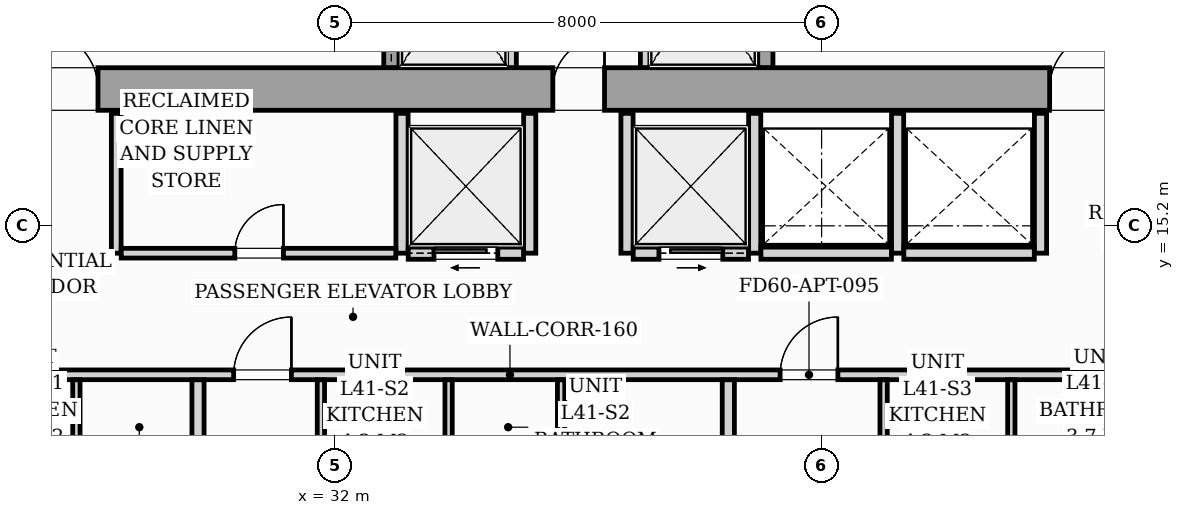
"""IFC4 building model, lengths in metres.
Left out: names, types, materials, properties, quantities, classifications, styles, units other than length and angle.
Written with IfcOpenShell. Run it as: python <this file> out.ifc"""

import sys

from ifc_helpers import new_model, si_unit, direction, frame, frame_2d, origin, origin_2d, place, context, subcontext, project, spatial, rectangle, i_section, extrude, source, transform, mapped, element, fill, save


model = new_model("IFC4")
c1 = context("Model", 3, precision=1e-05, world=origin(), true_north=direction((0.0, 1.0)))
c2 = subcontext(c1, "Body", "Model", "MODEL_VIEW")
j1 = project(units=[si_unit("LENGTHUNIT", "METRE"), si_unit("PLANEANGLEUNIT", "RADIAN")], contexts=[c1])
p1 = place(None, origin())
s1 = spatial("IfcSite", under=j1, at=p1, CompositionType="ELEMENT")
p2 = place(p1, origin())
s2 = spatial("IfcBuilding", under=s1, at=p2, CompositionType="ELEMENT")
p3 = place(p2, frame((0.0, 0.0, 143.8)))
s3 = spatial("IfcBuildingStorey", under=s2, at=p3, CompositionType="ELEMENT", Elevation=143.8)
m1 = source(origin(), c2, "Body", "SweptSolid", [
    extrude(i_section(OverallWidth=0.421, OverallDepth=0.465, WebThickness=0.045, FlangeThickness=0.073, FilletRadius=0.018, at=origin_2d()), origin(), (0.0, 0.0, 1.0), 3.196),
])
for number, where, z_axis, x_axis in (
    (1, (33.12, 17.4, 0.002), (0.0, 0.0, 1.0), (1.0, 0.0, 0.0)),
    (2, (38.88, 17.4, 0.002), (0.0, 0.0, 1.0), (1.0, 0.0, 0.0)),
):
    element("IfcColumn", number, at=place(p3, frame(where, z_axis=z_axis, x_axis=x_axis)), inside=s3, PredefinedType="PILASTER", context=c2, shape_type="MappedRepresentation", body=[
        mapped(m1, transform((0.0, 0.0, 0.0), scale=1.0)),
    ])
p4 = place(p3, frame((26.1, 17.45, 0.0), z_axis=(0.0, 0.0, 1.0), x_axis=(1.0, 0.0, 0.0)))
e3 = element("IfcWall", 3, at=p4, inside=s3, PredefinedType="SHEAR", context=c2, shape_type="SweptSolid", body=[
    extrude(rectangle(XDim=19.8, YDim=0.7, at=frame_2d((9.9, 0.0))), origin(), (0.0, 0.0, 1.0), 3.2),
])
p5 = place(p4, frame((1.05, 0.0, 0.0)))
e4 = element("IfcOpeningElement", 4, at=p5, cuts=e3, PredefinedType="OPENING", context=c2, shape_type="SweptSolid", body=[
    extrude(rectangle(XDim=0.95, YDim=2.06, at=frame_2d((0.475, 1.03))), frame((0.0, 0.36, 0.0), z_axis=(0.0, -1.0, 0.0), x_axis=(1.0, 0.0, 0.0)), (0.0, 0.0, 1.0), 0.72),
])
p6 = place(p4, frame((9.48, 0.0, 0.0)))
e5 = element("IfcOpeningElement", 5, at=p6, cuts=e3, PredefinedType="OPENING", context=c2, shape_type="SweptSolid", body=[
    extrude(rectangle(XDim=0.85, YDim=2.0, at=frame_2d((0.425, 1.0))), frame((0.0, 0.36, 0.0), z_axis=(0.0, -1.0, 0.0), x_axis=(1.0, 0.0, 0.0)), (0.0, 0.0, 1.0), 0.72),
])
p7 = place(p4, frame((17.65, 0.0, 0.0)))
e6 = element("IfcOpeningElement", 6, at=p7, cuts=e3, PredefinedType="OPENING", context=c2, shape_type="SweptSolid", body=[
    extrude(rectangle(XDim=0.95, YDim=2.06, at=frame_2d((0.475, 1.03))), frame((0.0, 0.36, 0.0), z_axis=(0.0, -1.0, 0.0), x_axis=(1.0, 0.0, 0.0)), (0.0, 0.0, 1.0), 0.72),
])
p8 = place(p3, frame((32.925, 17.802, 0.0), z_axis=(0.0, 0.0, 1.0), x_axis=(0.0, 1.0, 0.0)))
e7 = element("IfcWall", 7, at=p8, inside=s3, PredefinedType="SOLIDWALL", context=c2, shape_type="SweptSolid", body=[
    extrude(rectangle(XDim=2.646, YDim=0.25, at=frame_2d((1.323, 0.0))), origin(), (0.0, 0.0, 1.0), 3.2),
])
p9 = place(p8, frame((0.598, 0.0, 0.0)))
e8 = element("IfcOpeningElement", 8, at=p9, cuts=e7, PredefinedType="OPENING", context=c2, shape_type="SweptSolid", body=[
    extrude(rectangle(XDim=1.1, YDim=2.08, at=frame_2d((0.55, 1.04))), frame((0.0, 0.135, 0.0), z_axis=(0.0, -1.0, 0.0), x_axis=(1.0, 0.0, 0.0)), (0.0, 0.0, 1.0), 0.27),
])
for number, where, z_axis, x_axis in (
    (9, (34.9, 17.802, 0.0), (0.0, 0.0, 1.0), (0.0, 1.0, 0.0)),
    (10, (37.1, 17.802, 0.0), (0.0, 0.0, 1.0), (0.0, 1.0, 0.0)),
):
    element("IfcWall", number, at=place(p3, frame(where, z_axis=z_axis, x_axis=x_axis)), inside=s3, PredefinedType="PARTITIONING", context=c2, shape_type="SweptSolid", body=[
        extrude(rectangle(XDim=2.646, YDim=0.16, at=frame_2d((1.323, 0.0))), origin(), (0.0, 0.0, 1.0), 2.94),
    ])
p10 = place(p3, frame((39.075, 17.802, 0.0), z_axis=(0.0, 0.0, 1.0), x_axis=(0.0, 1.0, 0.0)))
e11 = element("IfcWall", 11, at=p10, inside=s3, PredefinedType="SOLIDWALL", context=c2, shape_type="SweptSolid", body=[
    extrude(rectangle(XDim=2.646, YDim=0.25, at=frame_2d((1.323, 0.0))), origin(), (0.0, 0.0, 1.0), 3.2),
])
p11 = place(p10, frame((0.598, 0.0, 0.0)))
e12 = element("IfcOpeningElement", 12, at=p11, cuts=e11, PredefinedType="OPENING", context=c2, shape_type="SweptSolid", body=[
    extrude(rectangle(XDim=1.1, YDim=2.08, at=frame_2d((0.55, 1.04))), frame((0.0, 0.135, 0.0), z_axis=(0.0, -1.0, 0.0), x_axis=(1.0, 0.0, 0.0)), (0.0, 0.0, 1.0), 0.27),
])
p12 = place(p3, frame((28.4, 14.75, 0.0), z_axis=(0.0, 0.0, 1.0), x_axis=(0.0, 1.0, 0.0)))
e13 = element("IfcWall", 13, at=p12, inside=s3, PredefinedType="PARTITIONING", context=c2, shape_type="SweptSolid", body=[
    extrude(rectangle(XDim=2.3, YDim=0.16, at=frame_2d((1.15, 0.0))), origin(), (0.0, 0.0, 1.0), 2.94),
])
p13 = place(p3, frame((33.1, 14.75, 0.0), z_axis=(0.0, 0.0, 1.0), x_axis=(0.0, 1.0, 0.0)))
e14 = element("IfcWall", 14, at=p13, inside=s3, PredefinedType="PARTITIONING", context=c2, shape_type="SweptSolid", body=[
    extrude(rectangle(XDim=2.3, YDim=0.2, at=frame_2d((1.15, 0.0))), origin(), (0.0, 0.0, 1.0), 2.94),
])
p14 = place(p3, frame((28.482, 14.75, 0.0), z_axis=(0.0, 0.0, 1.0), x_axis=(1.0, 0.0, 0.0)))
e15 = element("IfcWall", 15, at=p14, inside=s3, PredefinedType="PARTITIONING", context=c2, shape_type="SweptSolid", body=[
    extrude(rectangle(XDim=4.516, YDim=0.16, at=frame_2d((2.258, 0.0))), origin(), (0.0, 0.0, 1.0), 2.94),
])
p15 = place(p14, frame((1.868, 0.0, 0.0)))
e16 = element("IfcOpeningElement", 16, at=p15, cuts=e15, PredefinedType="OPENING", context=c2, shape_type="SweptSolid", body=[
    extrude(rectangle(XDim=0.8, YDim=2.05, at=frame_2d((0.4, 1.025))), frame((0.0, 0.09, 0.0), z_axis=(0.0, -1.0, 0.0), x_axis=(1.0, 0.0, 0.0)), (0.0, 0.0, 1.0), 0.18),
])
p16 = place(p3, frame((35.2, 14.75, 0.0), z_axis=(0.0, 0.0, 1.0), x_axis=(0.0, 1.0, 0.0)))
e17 = element("IfcWall", 17, at=p16, inside=s3, PredefinedType="PARTITIONING", context=c2, shape_type="SweptSolid", body=[
    extrude(rectangle(XDim=2.3, YDim=0.2, at=frame_2d((1.15, 0.0))), origin(), (0.0, 0.0, 1.0), 2.94),
])
p17 = place(p3, frame((33.202, 14.75, 0.0), z_axis=(0.0, 0.0, 1.0), x_axis=(1.0, 0.0, 0.0)))
e18 = element("IfcWall", 18, at=p17, inside=s3, PredefinedType="PARTITIONING", context=c2, shape_type="SweptSolid", body=[
    extrude(rectangle(XDim=1.896, YDim=0.2, at=frame_2d((0.948, 0.0))), origin(), (0.0, 0.0, 1.0), 2.94),
])
p18 = place(p17, frame((0.423, 0.0, 0.0)))
e19 = element("IfcOpeningElement", 19, at=p18, cuts=e18, PredefinedType="OPENING", context=c2, shape_type="SweptSolid", body=[
    extrude(rectangle(XDim=1.05, YDim=2.08, at=frame_2d((0.525, 1.04))), frame((0.0, 0.11, 0.0), z_axis=(0.0, -1.0, 0.0), x_axis=(1.0, 0.0, 0.0)), (0.0, 0.0, 1.0), 0.22),
])
for number, where, z_axis, x_axis in (
    (20, (36.8, 14.75, 0.0), (0.0, 0.0, 1.0), (0.0, 1.0, 0.0)),
    (21, (38.9, 14.75, 0.0), (0.0, 0.0, 1.0), (0.0, 1.0, 0.0)),
):
    element("IfcWall", number, at=place(p3, frame(where, z_axis=z_axis, x_axis=x_axis)), inside=s3, PredefinedType="PARTITIONING", context=c2, shape_type="SweptSolid", body=[
        extrude(rectangle(XDim=2.3, YDim=0.2, at=frame_2d((1.15, 0.0))), origin(), (0.0, 0.0, 1.0), 2.94),
    ])
p19 = place(p3, frame((36.902, 14.75, 0.0), z_axis=(0.0, 0.0, 1.0), x_axis=(1.0, 0.0, 0.0)))
e22 = element("IfcWall", 22, at=p19, inside=s3, PredefinedType="PARTITIONING", context=c2, shape_type="SweptSolid", body=[
    extrude(rectangle(XDim=1.896, YDim=0.2, at=frame_2d((0.948, 0.0))), origin(), (0.0, 0.0, 1.0), 2.94),
])
p20 = place(p19, frame((0.423, 0.0, 0.0)))
e23 = element("IfcOpeningElement", 23, at=p20, cuts=e22, PredefinedType="OPENING", context=c2, shape_type="SweptSolid", body=[
    extrude(rectangle(XDim=1.05, YDim=2.08, at=frame_2d((0.525, 1.04))), frame((0.0, 0.11, 0.0), z_axis=(0.0, -1.0, 0.0), x_axis=(1.0, 0.0, 0.0)), (0.0, 0.0, 1.0), 0.22),
])
for number, where, z_axis, x_axis in (
    (24, (41.25, 14.75, 0.0), (0.0, 0.0, 1.0), (0.0, 1.0, 0.0)),
    (25, (43.6, 14.75, 0.0), (0.0, 0.0, 1.0), (0.0, 1.0, 0.0)),
):
    element("IfcWall", number, at=place(p3, frame(where, z_axis=z_axis, x_axis=x_axis)), inside=s3, PredefinedType="PARTITIONING", context=c2, shape_type="SweptSolid", body=[
        extrude(rectangle(XDim=2.3, YDim=0.2, at=frame_2d((1.15, 0.0))), origin(), (0.0, 0.0, 1.0), 2.94),
    ])
for number, where, z_axis, x_axis in (
    (26, (39.002, 14.75, 0.0), (0.0, 0.0, 1.0), (1.0, 0.0, 0.0)),
    (27, (41.352, 14.75, 0.0), (0.0, 0.0, 1.0), (1.0, 0.0, 0.0)),
):
    element("IfcWall", number, at=place(p3, frame(where, z_axis=z_axis, x_axis=x_axis)), inside=s3, PredefinedType="PARTITIONING", context=c2, shape_type="SweptSolid", body=[
        extrude(rectangle(XDim=2.146, YDim=0.2, at=frame_2d((1.073, 0.0))), origin(), (0.0, 0.0, 1.0), 2.94),
    ])
p21 = place(p3, frame((22.05, 12.75, 0.0), z_axis=(0.0, 0.0, 1.0), x_axis=(1.0, 0.0, 0.0)))
e28 = element("IfcWall", 28, at=p21, inside=s3, PredefinedType="PARTITIONING", context=c2, shape_type="SweptSolid", body=[
    extrude(rectangle(XDim=25.65, YDim=0.16, at=frame_2d((12.825, 0.0))), origin(), (0.0, 0.0, 1.0), 2.94),
])
p22 = place(p21, frame((1.312, 0.0, 0.0)))
e29 = element("IfcOpeningElement", 29, at=p22, cuts=e28, PredefinedType="OPENING", context=c2, shape_type="SweptSolid", body=[
    extrude(rectangle(XDim=0.95, YDim=2.06, at=frame_2d((0.475, 1.03))), frame((0.0, 0.09, 0.0), z_axis=(0.0, -1.0, 0.0), x_axis=(1.0, 0.0, 0.0)), (0.0, 0.0, 1.0), 0.18),
])
p23 = place(p21, frame((8.281, 0.0, 0.0)))
e30 = element("IfcOpeningElement", 30, at=p23, cuts=e28, PredefinedType="OPENING", context=c2, shape_type="SweptSolid", body=[
    extrude(rectangle(XDim=0.95, YDim=2.06, at=frame_2d((0.475, 1.03))), frame((0.0, 0.09, 0.0), z_axis=(0.0, -1.0, 0.0), x_axis=(1.0, 0.0, 0.0)), (0.0, 0.0, 1.0), 0.18),
])
p24 = place(p21, frame((17.268, 0.0, 0.0)))
e31 = element("IfcOpeningElement", 31, at=p24, cuts=e28, PredefinedType="OPENING", context=c2, shape_type="SweptSolid", body=[
    extrude(rectangle(XDim=0.95, YDim=2.06, at=frame_2d((0.475, 1.03))), frame((0.0, 0.09, 0.0), z_axis=(0.0, -1.0, 0.0), x_axis=(1.0, 0.0, 0.0)), (0.0, 0.0, 1.0), 0.18),
])
p25 = place(p3, frame((27.745, 10.562, 0.0), z_axis=(0.0, 0.0, 1.0), x_axis=(0.0, 1.0, 0.0)))
e32 = element("IfcWall", 32, at=p25, inside=s3, PredefinedType="PARTITIONING", context=c2, shape_type="SweptSolid", body=[
    extrude(rectangle(XDim=2.106, YDim=0.12, at=frame_2d((1.053, 0.0))), origin(), (0.0, 0.0, 1.0), 2.94),
])
p26 = place(p3, frame((29.745, 10.562, 0.0), z_axis=(0.0, 0.0, 1.0), x_axis=(0.0, 1.0, 0.0)))
e33 = element("IfcWall", 33, at=p26, inside=s3, PredefinedType="PARTITIONING", context=c2, shape_type="SweptSolid", body=[
    extrude(rectangle(XDim=2.106, YDim=0.2, at=frame_2d((1.053, 0.0))), origin(), (0.0, 0.0, 1.0), 2.94),
])
p27 = place(p3, frame((35.716, 6.754, 0.0), z_axis=(0.0, 0.0, 1.0), x_axis=(0.0, 1.0, 0.0)))
e34 = element("IfcWall", 34, at=p27, inside=s3, PredefinedType="PARTITIONING", context=c2, shape_type="SweptSolid", body=[
    extrude(rectangle(XDim=5.914, YDim=0.12, at=frame_2d((2.957, 0.0))), origin(), (0.0, 0.0, 1.0), 2.94),
])
p28 = place(p27, frame((2.646, 0.0, 0.0)))
e35 = element("IfcOpeningElement", 35, at=p28, cuts=e34, PredefinedType="OPENING", context=c2, shape_type="SweptSolid", body=[
    extrude(rectangle(XDim=0.9, YDim=2.05, at=frame_2d((0.45, 1.025))), frame((0.0, 0.07, 0.0), z_axis=(0.0, -1.0, 0.0), x_axis=(1.0, 0.0, 0.0)), (0.0, 0.0, 1.0), 0.14),
])
for number, where, z_axis, x_axis in (
    (36, (33.866, 10.562, 0.0), (0.0, 0.0, 1.0), (0.0, 1.0, 0.0)),
    (37, (31.766, 10.562, 0.0), (0.0, 0.0, 1.0), (0.0, 1.0, 0.0)),
):
    element("IfcWall", number, at=place(p3, frame(where, z_axis=z_axis, x_axis=x_axis)), inside=s3, PredefinedType="PARTITIONING", context=c2, shape_type="SweptSolid", body=[
        extrude(rectangle(XDim=2.106, YDim=0.12, at=frame_2d((1.053, 0.0))), origin(), (0.0, 0.0, 1.0), 2.94),
    ])
p29 = place(p3, frame((38.466, 6.49, 0.0), z_axis=(0.0, 0.0, 1.0), x_axis=(0.0, 1.0, 0.0)))
e38 = element("IfcWall", 38, at=p29, inside=s3, PredefinedType="PARTITIONING", context=c2, shape_type="SweptSolid", body=[
    extrude(rectangle(XDim=6.178, YDim=0.2, at=frame_2d((3.089, 0.0))), origin(), (0.0, 0.0, 1.0), 2.94),
])
for number, where, z_axis, x_axis in (
    (39, (43.12, 10.562, 0.0), (0.0, 0.0, 1.0), (0.0, 1.0, 0.0)),
    (40, (41.02, 10.562, 0.0), (0.0, 0.0, 1.0), (0.0, 1.0, 0.0)),
):
    element("IfcWall", number, at=place(p3, frame(where, z_axis=z_axis, x_axis=x_axis)), inside=s3, PredefinedType="PARTITIONING", context=c2, shape_type="SweptSolid", body=[
        extrude(rectangle(XDim=2.106, YDim=0.12, at=frame_2d((1.053, 0.0))), origin(), (0.0, 0.0, 1.0), 2.94),
    ])
m2 = source(origin(), c2, "Body", "SweptSolid", [
    extrude(rectangle(XDim=0.95, YDim=2.06, at=frame_2d((0.475, 1.03))), frame((0.0, 0.025, 0.0), z_axis=(0.0, -1.0, 0.0), x_axis=(1.0, 0.0, 0.0)), (0.0, 0.0, 1.0), 0.05),
])
p30 = place(p5, origin())
e41 = element("IfcDoor", 41, at=p30, inside=s3, OperationType="SINGLE_SWING_LEFT", PredefinedType="DOOR", context=c2, shape_type="MappedRepresentation", body=[
    mapped(m2, transform((0.0, 0.0, 0.0), scale=1.0)),
])
fill(e4, e41)
m3 = source(origin(), c2, "Body", "SweptSolid", [
    extrude(rectangle(XDim=0.85, YDim=2.0, at=frame_2d((0.425, 1.0))), frame((0.0, 0.025, 0.0), z_axis=(0.0, -1.0, 0.0), x_axis=(1.0, 0.0, 0.0)), (0.0, 0.0, 1.0), 0.05),
])
p31 = place(p6, origin())
e42 = element("IfcDoor", 42, at=p31, inside=s3, OperationType="SINGLE_SWING_RIGHT", PredefinedType="DOOR", context=c2, shape_type="MappedRepresentation", body=[
    mapped(m3, transform((0.0, 0.0, 0.0), scale=1.0)),
])
fill(e5, e42)
p32 = place(p7, origin())
e43 = element("IfcDoor", 43, at=p32, inside=s3, OperationType="SINGLE_SWING_RIGHT", PredefinedType="DOOR", context=c2, shape_type="MappedRepresentation", body=[
    mapped(m2, transform((0.0, 0.0, 0.0), scale=1.0)),
])
fill(e6, e43)
m4 = source(origin(), c2, "Body", "SweptSolid", [
    extrude(rectangle(XDim=0.8, YDim=2.05, at=frame_2d((0.4, 1.025))), frame((0.0, 0.025, 0.0), z_axis=(0.0, -1.0, 0.0), x_axis=(1.0, 0.0, 0.0)), (0.0, 0.0, 1.0), 0.05),
])
p33 = place(p15, origin())
e44 = element("IfcDoor", 44, at=p33, inside=s3, OperationType="SINGLE_SWING_RIGHT", PredefinedType="DOOR", context=c2, shape_type="MappedRepresentation", body=[
    mapped(m4, transform((0.0, 0.0, 0.0), scale=1.0)),
])
fill(e16, e44)
m5 = source(origin(), c2, "Body", "SweptSolid", [
    extrude(rectangle(XDim=1.05, YDim=2.08, at=frame_2d((0.525, 1.04))), frame((0.0, 0.025, 0.0), z_axis=(0.0, -1.0, 0.0), x_axis=(1.0, 0.0, 0.0)), (0.0, 0.0, 1.0), 0.05),
])
p34 = place(p18, origin())
e45 = element("IfcDoor", 45, at=p34, inside=s3, OperationType="SLIDING_TO_LEFT", PredefinedType="DOOR", context=c2, shape_type="MappedRepresentation", body=[
    mapped(m5, transform((0.0, 0.0, 0.0), scale=1.0)),
])
fill(e19, e45)
p35 = place(p20, origin())
e46 = element("IfcDoor", 46, at=p35, inside=s3, OperationType="SLIDING_TO_RIGHT", PredefinedType="DOOR", context=c2, shape_type="MappedRepresentation", body=[
    mapped(m5, transform((0.0, 0.0, 0.0), scale=1.0)),
])
fill(e23, e46)
m6 = source(origin(), c2, "Body", "SweptSolid", [
    extrude(rectangle(XDim=0.95, YDim=2.06, at=frame_2d((0.475, 1.03))), frame((0.0, 0.025, 0.0), z_axis=(0.0, -1.0, 0.0), x_axis=(1.0, 0.0, 0.0)), (0.0, 0.0, 1.0), 0.05),
])
p36 = place(p23, origin())
e47 = element("IfcDoor", 47, at=p36, inside=s3, OperationType="SINGLE_SWING_RIGHT", PredefinedType="DOOR", context=c2, shape_type="MappedRepresentation", body=[
    mapped(m6, transform((0.0, 0.0, 0.0), scale=1.0)),
])
fill(e30, e47)
p37 = place(p24, origin())
e48 = element("IfcDoor", 48, at=p37, inside=s3, OperationType="SINGLE_SWING_RIGHT", PredefinedType="DOOR", context=c2, shape_type="MappedRepresentation", body=[
    mapped(m6, transform((0.0, 0.0, 0.0), scale=1.0)),
])
fill(e31, e48)
save(model, sys.argv[1])
